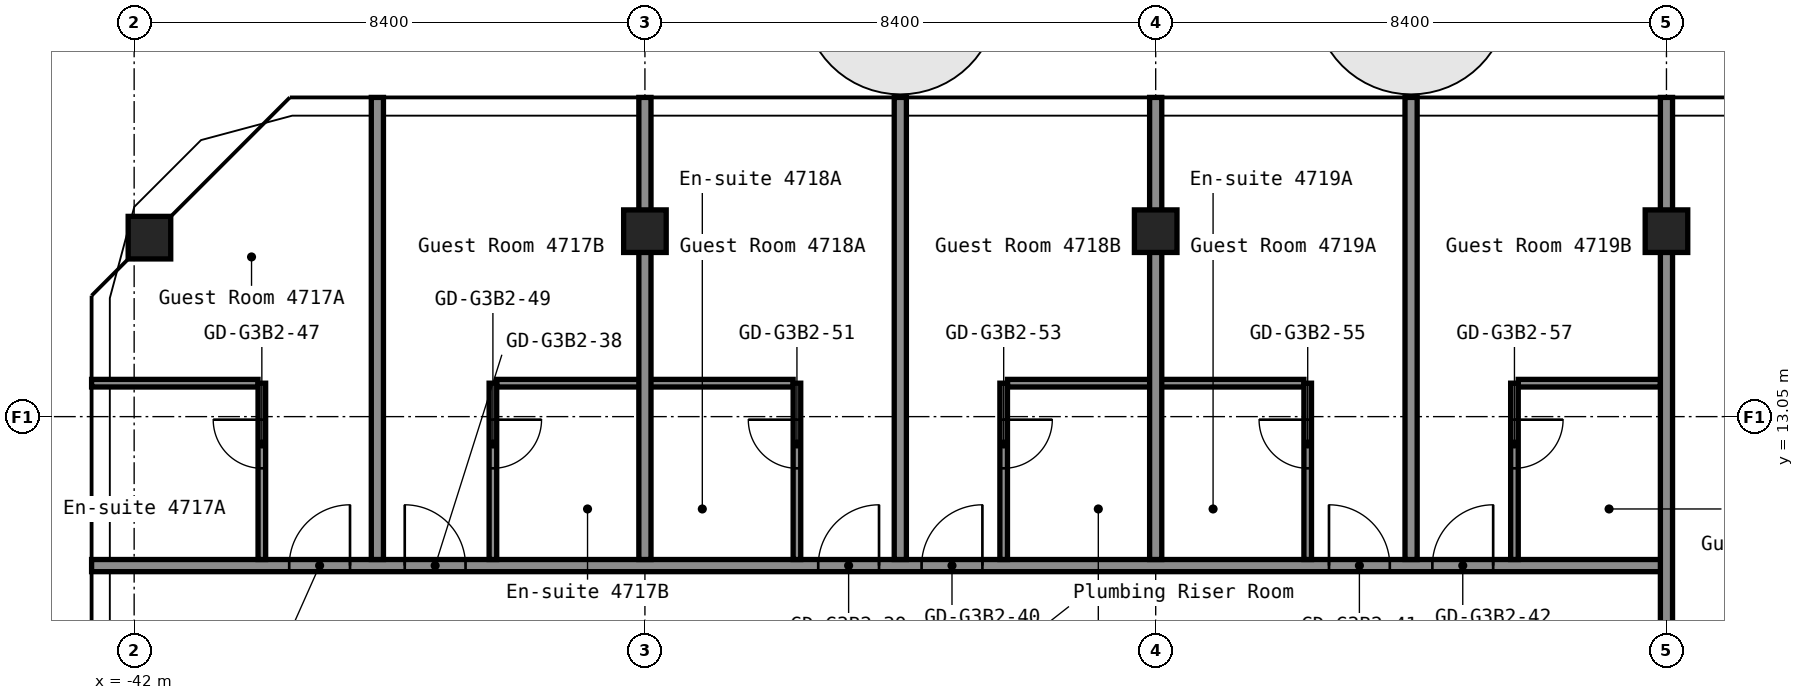
"""IFC4 building model, lengths in metres.
Left out: names, types, materials, properties, quantities, classifications, styles, units other than length and angle.
Written with IfcOpenShell. Run it as: python <this file> out.ifc"""

import sys

from ifc_helpers import new_model, si_unit, direction, frame, frame_2d, origin, origin_2d, place, context, subcontext, project, spatial, rectangle, hollow_rectangle, extrude, element, fill, save


model = new_model("IFC4")
c1 = context("Model", 3, precision=1e-05, world=origin(), true_north=direction((0.0, 1.0)))
c2 = subcontext(c1, "Body", "Model", "MODEL_VIEW")
j1 = project(units=[si_unit("LENGTHUNIT", "METRE"), si_unit("PLANEANGLEUNIT", "RADIAN")], contexts=[c1])
p1 = place(None, origin())
s1 = spatial("IfcSite", under=j1, at=p1, CompositionType="ELEMENT")
p2 = place(p1, origin())
s2 = spatial("IfcBuilding", under=s1, at=p2, CompositionType="ELEMENT")
p3 = place(p2, frame((0.0, 0.0, 166.2)))
s3 = spatial("IfcBuildingStorey", under=s2, at=p3, CompositionType="ELEMENT", Elevation=166.2)
for number, where, z_axis, x_axis in (
    (1, (-41.749, 15.994, 0.0), (0.0, 0.0, 1.0), (1.0, 0.0, 0.0)),
    (2, (-33.6, 16.1, 0.0), (0.0, 0.0, 1.0), (1.0, 0.0, 0.0)),
    (3, (-25.2, 16.1, 0.0), (0.0, 0.0, 1.0), (1.0, 0.0, 0.0)),
    (4, (-16.8, 16.1, 0.0), (0.0, 0.0, 1.0), (1.0, 0.0, 0.0)),
):
    element("IfcColumn", number, at=place(p3, frame(where, z_axis=z_axis, x_axis=x_axis)), inside=s3, PredefinedType="COLUMN", context=c2, shape_type="SweptSolid", body=[
        extrude(hollow_rectangle(XDim=0.7, YDim=0.7, WallThickness=0.028, at=origin_2d()), origin(), (0.0, 0.0, 1.0), 2.75),
    ])
p4 = place(p3, frame((-42.7, 10.6, 0.0), z_axis=(0.0, 0.0, 1.0), x_axis=(1.0, 0.0, 0.0)))
e5 = element("IfcWall", 5, at=p4, inside=s3, PredefinedType="PARTITIONING", context=c2, shape_type="SweptSolid", body=[
    extrude(rectangle(XDim=25.9, YDim=0.2, at=frame_2d((12.95, 0.0))), origin(), (0.0, 0.0, 1.0), 2.75),
])
p5 = place(p4, frame((3.25, 0.0, 0.0)))
e6 = element("IfcOpeningElement", 6, at=p5, cuts=e5, PredefinedType="OPENING", context=c2, shape_type="SweptSolid", body=[
    extrude(rectangle(XDim=1.0, YDim=2.1, at=frame_2d((0.5, 1.05))), frame((0.0, 0.11, 0.0), z_axis=(0.0, -1.0, 0.0), x_axis=(1.0, 0.0, 0.0)), (0.0, 0.0, 1.0), 0.22),
])
p6 = place(p4, frame((5.15, 0.0, 0.0)))
e7 = element("IfcOpeningElement", 7, at=p6, cuts=e5, PredefinedType="OPENING", context=c2, shape_type="SweptSolid", body=[
    extrude(rectangle(XDim=1.0, YDim=2.1, at=frame_2d((0.5, 1.05))), frame((0.0, 0.11, 0.0), z_axis=(0.0, -1.0, 0.0), x_axis=(1.0, 0.0, 0.0)), (0.0, 0.0, 1.0), 0.22),
])
p7 = place(p4, frame((11.95, 0.0, 0.0)))
e8 = element("IfcOpeningElement", 8, at=p7, cuts=e5, PredefinedType="OPENING", context=c2, shape_type="SweptSolid", body=[
    extrude(rectangle(XDim=1.0, YDim=2.1, at=frame_2d((0.5, 1.05))), frame((0.0, 0.11, 0.0), z_axis=(0.0, -1.0, 0.0), x_axis=(1.0, 0.0, 0.0)), (0.0, 0.0, 1.0), 0.22),
])
p8 = place(p4, frame((13.65, 0.0, 0.0)))
e9 = element("IfcOpeningElement", 9, at=p8, cuts=e5, PredefinedType="OPENING", context=c2, shape_type="SweptSolid", body=[
    extrude(rectangle(XDim=1.0, YDim=2.1, at=frame_2d((0.5, 1.05))), frame((0.0, 0.11, 0.0), z_axis=(0.0, -1.0, 0.0), x_axis=(1.0, 0.0, 0.0)), (0.0, 0.0, 1.0), 0.22),
])
p9 = place(p4, frame((20.35, 0.0, 0.0)))
e10 = element("IfcOpeningElement", 10, at=p9, cuts=e5, PredefinedType="OPENING", context=c2, shape_type="SweptSolid", body=[
    extrude(rectangle(XDim=1.0, YDim=2.1, at=frame_2d((0.5, 1.05))), frame((0.0, 0.11, 0.0), z_axis=(0.0, -1.0, 0.0), x_axis=(1.0, 0.0, 0.0)), (0.0, 0.0, 1.0), 0.22),
])
p10 = place(p4, frame((22.05, 0.0, 0.0)))
e11 = element("IfcOpeningElement", 11, at=p10, cuts=e5, PredefinedType="OPENING", context=c2, shape_type="SweptSolid", body=[
    extrude(rectangle(XDim=1.0, YDim=2.1, at=frame_2d((0.5, 1.05))), frame((0.0, 0.11, 0.0), z_axis=(0.0, -1.0, 0.0), x_axis=(1.0, 0.0, 0.0)), (0.0, 0.0, 1.0), 0.22),
])
p11 = place(p3, frame((-42.7, 13.6, 0.0), z_axis=(0.0, 0.0, 1.0), x_axis=(1.0, 0.0, 0.0)))
e12 = element("IfcWall", 12, at=p11, inside=s3, PredefinedType="PARTITIONING", context=c2, shape_type="SweptSolid", body=[
    extrude(rectangle(XDim=2.738, YDim=0.125, at=frame_2d((1.369, 0.0))), origin(), (0.0, 0.0, 1.0), 2.75),
])
for number, where, z_axis, x_axis in (
    (13, (-36.038, 13.6, 0.0), (0.0, 0.0, 1.0), (1.0, 0.0, 0.0)),
    (14, (-27.637, 13.6, 0.0), (0.0, 0.0, 1.0), (1.0, 0.0, 0.0)),
):
    element("IfcWall", number, at=place(p3, frame(where, z_axis=z_axis, x_axis=x_axis)), inside=s3, PredefinedType="PARTITIONING", context=c2, shape_type="SweptSolid", body=[
        extrude(rectangle(XDim=4.875, YDim=0.125, at=frame_2d((2.438, 0.0))), origin(), (0.0, 0.0, 1.0), 2.75),
    ])
p12 = place(p3, frame((-19.238, 13.6, 0.0), z_axis=(0.0, 0.0, 1.0), x_axis=(1.0, 0.0, 0.0)))
e15 = element("IfcWall", 15, at=p12, inside=s3, PredefinedType="PARTITIONING", context=c2, shape_type="SweptSolid", body=[
    extrude(rectangle(XDim=2.338, YDim=0.125, at=frame_2d((1.169, 0.0))), origin(), (0.0, 0.0, 1.0), 2.75),
])
p13 = place(p3, frame((-39.9, 10.7, 0.0), z_axis=(0.0, 0.0, 1.0), x_axis=(0.0, 1.0, 0.0)))
e16 = element("IfcWall", 16, at=p13, inside=s3, PredefinedType="PARTITIONING", context=c2, shape_type="SweptSolid", body=[
    extrude(rectangle(XDim=2.9, YDim=0.125, at=frame_2d((1.45, 0.0))), origin(), (0.0, 0.0, 1.0), 2.75),
])
p14 = place(p13, frame((1.5, 0.0, 0.0)))
e17 = element("IfcOpeningElement", 17, at=p14, cuts=e16, PredefinedType="OPENING", context=c2, shape_type="SweptSolid", body=[
    extrude(rectangle(XDim=0.8, YDim=2.1, at=frame_2d((0.4, 1.05))), frame((0.0, 0.073, 0.0), z_axis=(0.0, -1.0, 0.0), x_axis=(1.0, 0.0, 0.0)), (0.0, 0.0, 1.0), 0.145),
])
p15 = place(p3, frame((-38.0, 10.7, 0.0), z_axis=(0.0, 0.0, 1.0), x_axis=(0.0, 1.0, 0.0)))
e18 = element("IfcWall", 18, at=p15, inside=s3, PredefinedType="PARTITIONING", context=c2, shape_type="SweptSolid", body=[
    extrude(rectangle(XDim=7.6, YDim=0.2, at=frame_2d((3.8, 0.0))), origin(), (0.0, 0.0, 1.0), 2.75),
])
p16 = place(p3, frame((-36.1, 10.7, 0.0), z_axis=(0.0, 0.0, 1.0), x_axis=(0.0, 1.0, 0.0)))
e19 = element("IfcWall", 19, at=p16, inside=s3, PredefinedType="PARTITIONING", context=c2, shape_type="SweptSolid", body=[
    extrude(rectangle(XDim=2.9, YDim=0.125, at=frame_2d((1.45, 0.0))), origin(), (0.0, 0.0, 1.0), 2.75),
])
p17 = place(p16, frame((1.5, 0.0, 0.0)))
e20 = element("IfcOpeningElement", 20, at=p17, cuts=e19, PredefinedType="OPENING", context=c2, shape_type="SweptSolid", body=[
    extrude(rectangle(XDim=0.8, YDim=2.1, at=frame_2d((0.4, 1.05))), frame((0.0, 0.073, 0.0), z_axis=(0.0, -1.0, 0.0), x_axis=(1.0, 0.0, 0.0)), (0.0, 0.0, 1.0), 0.145),
])
p18 = place(p3, frame((-33.6, 10.7, 0.0), z_axis=(0.0, 0.0, 1.0), x_axis=(0.0, 1.0, 0.0)))
e21 = element("IfcWall", 21, at=p18, inside=s3, PredefinedType="PARTITIONING", context=c2, shape_type="SweptSolid", body=[
    extrude(rectangle(XDim=7.6, YDim=0.2, at=frame_2d((3.8, 0.0))), origin(), (0.0, 0.0, 1.0), 2.75),
])
p19 = place(p3, frame((-31.1, 10.7, 0.0), z_axis=(0.0, 0.0, 1.0), x_axis=(0.0, 1.0, 0.0)))
e22 = element("IfcWall", 22, at=p19, inside=s3, PredefinedType="PARTITIONING", context=c2, shape_type="SweptSolid", body=[
    extrude(rectangle(XDim=2.9, YDim=0.125, at=frame_2d((1.45, 0.0))), origin(), (0.0, 0.0, 1.0), 2.75),
])
p20 = place(p19, frame((1.5, 0.0, 0.0)))
e23 = element("IfcOpeningElement", 23, at=p20, cuts=e22, PredefinedType="OPENING", context=c2, shape_type="SweptSolid", body=[
    extrude(rectangle(XDim=0.8, YDim=2.1, at=frame_2d((0.4, 1.05))), frame((0.0, 0.073, 0.0), z_axis=(0.0, -1.0, 0.0), x_axis=(1.0, 0.0, 0.0)), (0.0, 0.0, 1.0), 0.145),
])
p21 = place(p3, frame((-29.4, 10.7, 0.0), z_axis=(0.0, 0.0, 1.0), x_axis=(0.0, 1.0, 0.0)))
e24 = element("IfcWall", 24, at=p21, inside=s3, PredefinedType="PARTITIONING", context=c2, shape_type="SweptSolid", body=[
    extrude(rectangle(XDim=7.6, YDim=0.2, at=frame_2d((3.8, 0.0))), origin(), (0.0, 0.0, 1.0), 2.75),
])
p22 = place(p3, frame((-27.7, 10.7, 0.0), z_axis=(0.0, 0.0, 1.0), x_axis=(0.0, 1.0, 0.0)))
e25 = element("IfcWall", 25, at=p22, inside=s3, PredefinedType="PARTITIONING", context=c2, shape_type="SweptSolid", body=[
    extrude(rectangle(XDim=2.9, YDim=0.125, at=frame_2d((1.45, 0.0))), origin(), (0.0, 0.0, 1.0), 2.75),
])
p23 = place(p22, frame((1.5, 0.0, 0.0)))
e26 = element("IfcOpeningElement", 26, at=p23, cuts=e25, PredefinedType="OPENING", context=c2, shape_type="SweptSolid", body=[
    extrude(rectangle(XDim=0.8, YDim=2.1, at=frame_2d((0.4, 1.05))), frame((0.0, 0.073, 0.0), z_axis=(0.0, -1.0, 0.0), x_axis=(1.0, 0.0, 0.0)), (0.0, 0.0, 1.0), 0.145),
])
p24 = place(p3, frame((-25.2, 10.7, 0.0), z_axis=(0.0, 0.0, 1.0), x_axis=(0.0, 1.0, 0.0)))
e27 = element("IfcWall", 27, at=p24, inside=s3, PredefinedType="PARTITIONING", context=c2, shape_type="SweptSolid", body=[
    extrude(rectangle(XDim=7.6, YDim=0.2, at=frame_2d((3.8, 0.0))), origin(), (0.0, 0.0, 1.0), 2.75),
])
p25 = place(p3, frame((-22.7, 10.7, 0.0), z_axis=(0.0, 0.0, 1.0), x_axis=(0.0, 1.0, 0.0)))
e28 = element("IfcWall", 28, at=p25, inside=s3, PredefinedType="PARTITIONING", context=c2, shape_type="SweptSolid", body=[
    extrude(rectangle(XDim=2.9, YDim=0.125, at=frame_2d((1.45, 0.0))), origin(), (0.0, 0.0, 1.0), 2.75),
])
p26 = place(p25, frame((1.5, 0.0, 0.0)))
e29 = element("IfcOpeningElement", 29, at=p26, cuts=e28, PredefinedType="OPENING", context=c2, shape_type="SweptSolid", body=[
    extrude(rectangle(XDim=0.8, YDim=2.1, at=frame_2d((0.4, 1.05))), frame((0.0, 0.073, 0.0), z_axis=(0.0, -1.0, 0.0), x_axis=(1.0, 0.0, 0.0)), (0.0, 0.0, 1.0), 0.145),
])
p27 = place(p3, frame((-21.0, 10.7, 0.0), z_axis=(0.0, 0.0, 1.0), x_axis=(0.0, 1.0, 0.0)))
e30 = element("IfcWall", 30, at=p27, inside=s3, PredefinedType="PARTITIONING", context=c2, shape_type="SweptSolid", body=[
    extrude(rectangle(XDim=7.6, YDim=0.2, at=frame_2d((3.8, 0.0))), origin(), (0.0, 0.0, 1.0), 2.75),
])
p28 = place(p3, frame((-19.3, 10.7, 0.0), z_axis=(0.0, 0.0, 1.0), x_axis=(0.0, 1.0, 0.0)))
e31 = element("IfcWall", 31, at=p28, inside=s3, PredefinedType="PARTITIONING", context=c2, shape_type="SweptSolid", body=[
    extrude(rectangle(XDim=2.9, YDim=0.125, at=frame_2d((1.45, 0.0))), origin(), (0.0, 0.0, 1.0), 2.75),
])
p29 = place(p28, frame((1.5, 0.0, 0.0)))
e32 = element("IfcOpeningElement", 32, at=p29, cuts=e31, PredefinedType="OPENING", context=c2, shape_type="SweptSolid", body=[
    extrude(rectangle(XDim=0.8, YDim=2.1, at=frame_2d((0.4, 1.05))), frame((0.0, 0.073, 0.0), z_axis=(0.0, -1.0, 0.0), x_axis=(1.0, 0.0, 0.0)), (0.0, 0.0, 1.0), 0.145),
])
p30 = place(p3, frame((-16.8, 8.39, 0.0), z_axis=(0.0, 0.0, 1.0), x_axis=(0.0, 1.0, 0.0)))
e33 = element("IfcWall", 33, at=p30, inside=s3, PredefinedType="PARTITIONING", context=c2, shape_type="SweptSolid", body=[
    extrude(rectangle(XDim=9.91, YDim=0.2, at=frame_2d((4.955, 0.0))), origin(), (0.0, 0.0, 1.0), 2.75),
])
p31 = place(p5, origin())
e34 = element("IfcDoor", 34, at=p31, inside=s3, OperationType="SINGLE_SWING_LEFT", PredefinedType="DOOR", context=c2, shape_type="SweptSolid", body=[
    extrude(rectangle(XDim=1.0, YDim=2.1, at=frame_2d((0.5, 1.05))), frame((0.0, 0.025, 0.0), z_axis=(0.0, -1.0, 0.0), x_axis=(1.0, 0.0, 0.0)), (0.0, 0.0, 1.0), 0.05),
])
fill(e6, e34)
p32 = place(p6, origin())
e35 = element("IfcDoor", 35, at=p32, inside=s3, OperationType="SINGLE_SWING_RIGHT", PredefinedType="DOOR", context=c2, shape_type="SweptSolid", body=[
    extrude(rectangle(XDim=1.0, YDim=2.1, at=frame_2d((0.5, 1.05))), frame((0.0, 0.025, 0.0), z_axis=(0.0, -1.0, 0.0), x_axis=(1.0, 0.0, 0.0)), (0.0, 0.0, 1.0), 0.05),
])
fill(e7, e35)
p33 = place(p7, origin())
e36 = element("IfcDoor", 36, at=p33, inside=s3, OperationType="SINGLE_SWING_LEFT", PredefinedType="DOOR", context=c2, shape_type="SweptSolid", body=[
    extrude(rectangle(XDim=1.0, YDim=2.1, at=frame_2d((0.5, 1.05))), frame((0.0, 0.025, 0.0), z_axis=(0.0, -1.0, 0.0), x_axis=(1.0, 0.0, 0.0)), (0.0, 0.0, 1.0), 0.05),
])
fill(e8, e36)
p34 = place(p8, origin())
e37 = element("IfcDoor", 37, at=p34, inside=s3, OperationType="SINGLE_SWING_LEFT", PredefinedType="DOOR", context=c2, shape_type="SweptSolid", body=[
    extrude(rectangle(XDim=1.0, YDim=2.1, at=frame_2d((0.5, 1.05))), frame((0.0, 0.025, 0.0), z_axis=(0.0, -1.0, 0.0), x_axis=(1.0, 0.0, 0.0)), (0.0, 0.0, 1.0), 0.05),
])
fill(e9, e37)
p35 = place(p9, origin())
e38 = element("IfcDoor", 38, at=p35, inside=s3, OperationType="SINGLE_SWING_RIGHT", PredefinedType="DOOR", context=c2, shape_type="SweptSolid", body=[
    extrude(rectangle(XDim=1.0, YDim=2.1, at=frame_2d((0.5, 1.05))), frame((0.0, 0.025, 0.0), z_axis=(0.0, -1.0, 0.0), x_axis=(1.0, 0.0, 0.0)), (0.0, 0.0, 1.0), 0.05),
])
fill(e10, e38)
p36 = place(p10, origin())
e39 = element("IfcDoor", 39, at=p36, inside=s3, OperationType="SINGLE_SWING_LEFT", PredefinedType="DOOR", context=c2, shape_type="SweptSolid", body=[
    extrude(rectangle(XDim=1.0, YDim=2.1, at=frame_2d((0.5, 1.05))), frame((0.0, 0.025, 0.0), z_axis=(0.0, -1.0, 0.0), x_axis=(1.0, 0.0, 0.0)), (0.0, 0.0, 1.0), 0.05),
])
fill(e11, e39)
p37 = place(p14, origin())
e40 = element("IfcDoor", 40, at=p37, inside=s3, OperationType="SINGLE_SWING_LEFT", PredefinedType="DOOR", context=c2, shape_type="SweptSolid", body=[
    extrude(rectangle(XDim=0.8, YDim=2.1, at=frame_2d((0.4, 1.05))), frame((0.0, 0.025, 0.0), z_axis=(0.0, -1.0, 0.0), x_axis=(1.0, 0.0, 0.0)), (0.0, 0.0, 1.0), 0.05),
])
fill(e17, e40)
p38 = place(p17, origin())
e41 = element("IfcDoor", 41, at=p38, inside=s3, OperationType="SINGLE_SWING_RIGHT", PredefinedType="DOOR", context=c2, shape_type="SweptSolid", body=[
    extrude(rectangle(XDim=0.8, YDim=2.1, at=frame_2d((0.4, 1.05))), frame((0.0, 0.025, 0.0), z_axis=(0.0, -1.0, 0.0), x_axis=(1.0, 0.0, 0.0)), (0.0, 0.0, 1.0), 0.05),
])
fill(e20, e41)
p39 = place(p20, origin())
e42 = element("IfcDoor", 42, at=p39, inside=s3, OperationType="SINGLE_SWING_LEFT", PredefinedType="DOOR", context=c2, shape_type="SweptSolid", body=[
    extrude(rectangle(XDim=0.8, YDim=2.1, at=frame_2d((0.4, 1.05))), frame((0.0, 0.025, 0.0), z_axis=(0.0, -1.0, 0.0), x_axis=(1.0, 0.0, 0.0)), (0.0, 0.0, 1.0), 0.05),
])
fill(e23, e42)
p40 = place(p23, origin())
e43 = element("IfcDoor", 43, at=p40, inside=s3, OperationType="SINGLE_SWING_RIGHT", PredefinedType="DOOR", context=c2, shape_type="SweptSolid", body=[
    extrude(rectangle(XDim=0.8, YDim=2.1, at=frame_2d((0.4, 1.05))), frame((0.0, 0.025, 0.0), z_axis=(0.0, -1.0, 0.0), x_axis=(1.0, 0.0, 0.0)), (0.0, 0.0, 1.0), 0.05),
])
fill(e26, e43)
p41 = place(p26, origin())
e44 = element("IfcDoor", 44, at=p41, inside=s3, OperationType="SINGLE_SWING_LEFT", PredefinedType="DOOR", context=c2, shape_type="SweptSolid", body=[
    extrude(rectangle(XDim=0.8, YDim=2.1, at=frame_2d((0.4, 1.05))), frame((0.0, 0.025, 0.0), z_axis=(0.0, -1.0, 0.0), x_axis=(1.0, 0.0, 0.0)), (0.0, 0.0, 1.0), 0.05),
])
fill(e29, e44)
p42 = place(p29, origin())
e45 = element("IfcDoor", 45, at=p42, inside=s3, OperationType="SINGLE_SWING_RIGHT", PredefinedType="DOOR", context=c2, shape_type="SweptSolid", body=[
    extrude(rectangle(XDim=0.8, YDim=2.1, at=frame_2d((0.4, 1.05))), frame((0.0, 0.025, 0.0), z_axis=(0.0, -1.0, 0.0), x_axis=(1.0, 0.0, 0.0)), (0.0, 0.0, 1.0), 0.05),
])
fill(e32, e45)
save(model, sys.argv[1])
